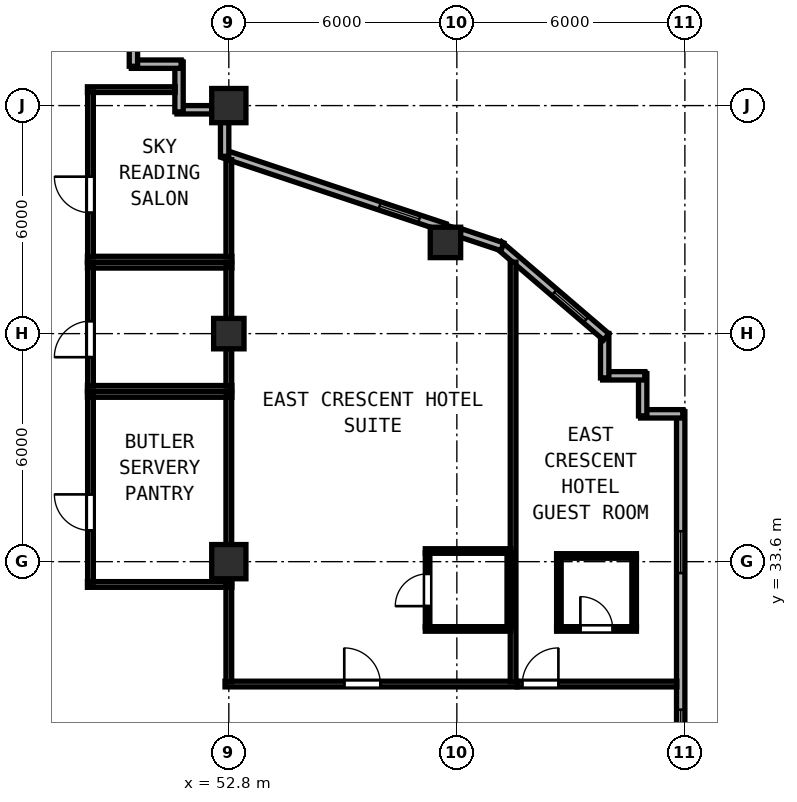
"""IFC4 building model, lengths in metres.
Left out: names, types, materials, properties, quantities, classifications, styles, units other than length and angle.
Written with IfcOpenShell. Run it as: python <this file> out.ifc"""

import sys

from ifc_helpers import new_model, si_unit, direction, frame, frame_2d, origin, origin_2d, place, context, subcontext, project, spatial, rectangle, hollow_rectangle, extrude, element, fill, save


model = new_model("IFC4")
c1 = context("Model", 3, precision=1e-05, world=origin(), true_north=direction((0.0, 1.0)))
c2 = subcontext(c1, "Body", "Model", "MODEL_VIEW")
j1 = project(units=[si_unit("LENGTHUNIT", "METRE"), si_unit("PLANEANGLEUNIT", "RADIAN")], contexts=[c1])
p1 = place(None, origin())
s1 = spatial("IfcSite", under=j1, at=p1, CompositionType="ELEMENT")
p2 = place(p1, origin())
s2 = spatial("IfcBuilding", under=s1, at=p2, CompositionType="ELEMENT")
p3 = place(p2, frame((0.0, 0.0, 184.2)))
s3 = spatial("IfcBuildingStorey", under=s2, at=p3, CompositionType="ELEMENT", Elevation=184.2)
for number, where, z_axis, x_axis in (
    (1, (52.8, 33.6, 0.0), (0.0, 0.0, 1.0), (1.0, 0.0, 0.0)),
    (2, (52.8, 45.6, 0.0), (0.0, 0.0, 1.0), (1.0, 0.0, 0.0)),
):
    element("IfcColumn", number, at=place(p3, frame(where, z_axis=z_axis, x_axis=x_axis)), inside=s3, PredefinedType="COLUMN", context=c2, shape_type="SweptSolid", body=[
        extrude(hollow_rectangle(XDim=0.9, YDim=0.9, WallThickness=0.034, at=origin_2d()), origin(), (0.0, 0.0, 1.0), 3.8),
    ])
for number, where, z_axis, x_axis in (
    (3, (52.8, 39.6, 0.0), (0.0, 0.0, 1.0), (1.0, 0.0, 0.0)),
    (4, (58.5, 42.0, 0.0), (0.0, 0.0, 1.0), (1.0, 0.0, 0.0)),
):
    element("IfcColumn", number, at=place(p3, frame(where, z_axis=z_axis, x_axis=x_axis)), inside=s3, PredefinedType="COLUMN", context=c2, shape_type="SweptSolid", body=[
        extrude(hollow_rectangle(XDim=0.8, YDim=0.8, WallThickness=0.03, at=origin_2d()), origin(), (0.0, 0.0, 1.0), 3.8),
    ])
p4 = place(p3, frame((64.69, 16.4, 0.0), z_axis=(0.0, 0.0, 1.0), x_axis=(0.0, 1.0, 0.0)))
e5 = element("IfcWall", 5, at=p4, inside=s3, PredefinedType="SOLIDWALL", context=c2, shape_type="SweptSolid", body=[
    extrude(rectangle(XDim=21.145, YDim=0.22, at=frame_2d((10.573, 0.0))), origin(), (0.0, 0.0, 1.0), 3.62),
])
p5 = place(p4, frame((1.05, 0.0, 0.85)))
e6 = element("IfcOpeningElement", 6, at=p5, cuts=e5, PredefinedType="OPENING", context=c2, shape_type="SweptSolid", body=[
    extrude(rectangle(XDim=1.1, YDim=1.75, at=frame_2d((0.55, 0.875))), frame((0.0, 0.12, 0.0), z_axis=(0.0, -1.0, 0.0), x_axis=(1.0, 0.0, 0.0)), (0.0, 0.0, 1.0), 0.24),
])
p6 = place(p4, frame((6.1, 0.0, 0.85)))
e7 = element("IfcOpeningElement", 7, at=p6, cuts=e5, PredefinedType="OPENING", context=c2, shape_type="SweptSolid", body=[
    extrude(rectangle(XDim=1.1, YDim=1.75, at=frame_2d((0.55, 0.875))), frame((0.0, 0.12, 0.0), z_axis=(0.0, -1.0, 0.0), x_axis=(1.0, 0.0, 0.0)), (0.0, 0.0, 1.0), 0.24),
])
p7 = place(p4, frame((12.205, 0.0, 0.85)))
e8 = element("IfcOpeningElement", 8, at=p7, cuts=e5, PredefinedType="OPENING", context=c2, shape_type="SweptSolid", body=[
    extrude(rectangle(XDim=1.1, YDim=1.75, at=frame_2d((0.55, 0.875))), frame((0.0, 0.12, 0.0), z_axis=(0.0, -1.0, 0.0), x_axis=(1.0, 0.0, 0.0)), (0.0, 0.0, 1.0), 0.24),
])
p8 = place(p4, frame((16.9, 0.0, 0.85)))
e9 = element("IfcOpeningElement", 9, at=p8, cuts=e5, PredefinedType="OPENING", context=c2, shape_type="SweptSolid", body=[
    extrude(rectangle(XDim=1.1, YDim=1.75, at=frame_2d((0.55, 0.875))), frame((0.0, 0.12, 0.0), z_axis=(0.0, -1.0, 0.0), x_axis=(1.0, 0.0, 0.0)), (0.0, 0.0, 1.0), 0.24),
])
p9 = place(p3, frame((64.745, 37.49, 0.0), z_axis=(0.0, 0.0, 1.0), x_axis=(-1.0, 0.0, 0.0)))
e10 = element("IfcWall", 10, at=p9, inside=s3, PredefinedType="SOLIDWALL", context=c2, shape_type="SweptSolid", body=[
    extrude(rectangle(XDim=1.11, YDim=0.22, at=frame_2d((0.555, 0.0))), origin(), (0.0, 0.0, 1.0), 3.62),
])
p10 = place(p3, frame((63.69, 37.435, 0.0), z_axis=(0.0, 0.0, 1.0), x_axis=(0.0, 1.0, 0.0)))
e11 = element("IfcWall", 11, at=p10, inside=s3, PredefinedType="SOLIDWALL", context=c2, shape_type="SweptSolid", body=[
    extrude(rectangle(XDim=1.11, YDim=0.22, at=frame_2d((0.555, 0.0))), origin(), (0.0, 0.0, 1.0), 3.62),
])
p11 = place(p3, frame((63.745, 38.49, 0.0), z_axis=(0.0, 0.0, 1.0), x_axis=(-1.0, 0.0, 0.0)))
e12 = element("IfcWall", 12, at=p11, inside=s3, PredefinedType="SOLIDWALL", context=c2, shape_type="SweptSolid", body=[
    extrude(rectangle(XDim=1.11, YDim=0.22, at=frame_2d((0.555, 0.0))), origin(), (0.0, 0.0, 1.0), 3.62),
])
p12 = place(p3, frame((62.69, 38.435, 0.0), z_axis=(0.0, 0.0, 1.0), x_axis=(0.0, 1.0, 0.0)))
e13 = element("IfcWall", 13, at=p12, inside=s3, PredefinedType="SOLIDWALL", context=c2, shape_type="SweptSolid", body=[
    extrude(rectangle(XDim=1.169, YDim=0.22, at=frame_2d((0.585, 0.0))), origin(), (0.0, 0.0, 1.0), 3.62),
])
p13 = place(p3, frame((62.732, 39.514, 0.0), z_axis=(0.0, 0.0, 1.0), x_axis=(-0.759251976569, 0.65079677018, 0.0)))
e14 = element("IfcWall", 14, at=p13, inside=s3, PredefinedType="SOLIDWALL", context=c2, shape_type="SweptSolid", body=[
    extrude(rectangle(XDim=3.726, YDim=0.22, at=frame_2d((1.863, 0.0))), origin(), (0.0, 0.0, 1.0), 3.62),
])
p14 = place(p13, frame((0.7, 0.0, 0.85)))
e15 = element("IfcOpeningElement", 15, at=p14, cuts=e14, PredefinedType="OPENING", context=c2, shape_type="SweptSolid", body=[
    extrude(rectangle(XDim=1.1, YDim=1.75, at=frame_2d((0.55, 0.875))), frame((0.0, 0.12, 0.0), z_axis=(0.0, -1.0, 0.0), x_axis=(1.0, 0.0, 0.0)), (0.0, 0.0, 1.0), 0.24),
])
p15 = place(p3, frame((59.997, 41.885, 0.0), z_axis=(0.0, 0.0, 1.0), x_axis=(-0.948662335685, 0.316290646166, 0.0)))
e16 = element("IfcWall", 16, at=p15, inside=s3, PredefinedType="SOLIDWALL", context=c2, shape_type="SweptSolid", body=[
    extrude(rectangle(XDim=1.165, YDim=0.22, at=frame_2d((0.583, 0.0))), origin(), (0.0, 0.0, 1.0), 3.62),
])
p16 = place(p3, frame((58.476, 42.392, 0.0), z_axis=(0.0, 0.0, 1.0), x_axis=(-0.948691231611, 0.316203964339, 0.0)))
e17 = element("IfcWall", 17, at=p16, inside=s3, PredefinedType="SOLIDWALL", context=c2, shape_type="SweptSolid", body=[
    extrude(rectangle(XDim=6.154, YDim=0.22, at=frame_2d((3.077, 0.0))), origin(), (0.0, 0.0, 1.0), 3.215),
])
p17 = place(p16, frame((0.7, 0.0, 0.85)))
e18 = element("IfcOpeningElement", 18, at=p17, cuts=e17, PredefinedType="OPENING", context=c2, shape_type="SweptSolid", body=[
    extrude(rectangle(XDim=1.1, YDim=1.75, at=frame_2d((0.55, 0.875))), frame((0.0, 0.12, 0.0), z_axis=(0.0, -1.0, 0.0), x_axis=(1.0, 0.0, 0.0)), (0.0, 0.0, 1.0), 0.24),
])
p18 = place(p3, frame((52.69, 44.266, 0.0), z_axis=(0.0, 0.0, 1.0), x_axis=(0.0, 1.0, 0.0)))
e19 = element("IfcWall", 19, at=p18, inside=s3, PredefinedType="SOLIDWALL", context=c2, shape_type="SweptSolid", body=[
    extrude(rectangle(XDim=0.892, YDim=0.22, at=frame_2d((0.446, 0.0))), origin(), (0.0, 0.0, 1.0), 3.215),
])
p19 = place(p3, frame((52.358, 45.49, 0.0), z_axis=(0.0, 0.0, 1.0), x_axis=(-1.0, 0.0, 0.0)))
e20 = element("IfcWall", 20, at=p19, inside=s3, PredefinedType="SOLIDWALL", context=c2, shape_type="SweptSolid", body=[
    extrude(rectangle(XDim=0.923, YDim=0.22, at=frame_2d((0.461, 0.0))), origin(), (0.0, 0.0, 1.0), 3.62),
])
p20 = place(p3, frame((51.49, 45.435, 0.0), z_axis=(0.0, 0.0, 1.0), x_axis=(0.0, 1.0, 0.0)))
e21 = element("IfcWall", 21, at=p20, inside=s3, PredefinedType="SOLIDWALL", context=c2, shape_type="SweptSolid", body=[
    extrude(rectangle(XDim=1.31, YDim=0.22, at=frame_2d((0.655, 0.0))), origin(), (0.0, 0.0, 1.0), 3.62),
])
p21 = place(p3, frame((51.545, 46.69, 0.0), z_axis=(0.0, 0.0, 1.0), x_axis=(-1.0, 0.0, 0.0)))
e22 = element("IfcWall", 22, at=p21, inside=s3, PredefinedType="SOLIDWALL", context=c2, shape_type="SweptSolid", body=[
    extrude(rectangle(XDim=1.31, YDim=0.22, at=frame_2d((0.655, 0.0))), origin(), (0.0, 0.0, 1.0), 3.62),
])
p22 = place(p3, frame((50.29, 46.635, 0.0), z_axis=(0.0, 0.0, 1.0), x_axis=(0.0, 1.0, 0.0)))
e23 = element("IfcWall", 23, at=p22, inside=s3, PredefinedType="SOLIDWALL", context=c2, shape_type="SweptSolid", body=[
    extrude(rectangle(XDim=1.535, YDim=0.22, at=frame_2d((0.768, 0.0))), origin(), (0.0, 0.0, 1.0), 3.62),
])
for number, where, z_axis, x_axis in (
    (24, (49.08, 38.0, 0.0), (0.0, 0.0, 1.0), (1.0, 0.0, 0.0)),
    (25, (49.08, 33.0, 0.0), (0.0, 0.0, 1.0), (1.0, 0.0, 0.0)),
):
    element("IfcWall", number, at=place(p3, frame(where, z_axis=z_axis, x_axis=x_axis)), inside=s3, PredefinedType="PARTITIONING", context=c2, shape_type="SweptSolid", body=[
        extrude(rectangle(XDim=3.8, YDim=0.15, at=frame_2d((1.9, 0.0))), origin(), (0.0, 0.0, 1.0), 3.62),
    ])
p23 = place(p3, frame((49.16, 33.06, 0.0), z_axis=(0.0, 0.0, 1.0), x_axis=(0.0, 1.0, 0.0)))
e26 = element("IfcWall", 26, at=p23, inside=s3, PredefinedType="PARTITIONING", context=c2, shape_type="SweptSolid", body=[
    extrude(rectangle(XDim=4.88, YDim=0.15, at=frame_2d((2.44, 0.0))), origin(), (0.0, 0.0, 1.0), 3.62),
])
p24 = place(p23, frame((1.36, 0.0, 0.0)))
e27 = element("IfcOpeningElement", 27, at=p24, cuts=e26, PredefinedType="OPENING", context=c2, shape_type="SweptSolid", body=[
    extrude(rectangle(XDim=0.95, YDim=2.12, at=frame_2d((0.475, 1.06))), frame((0.0, 0.085, 0.0), z_axis=(0.0, -1.0, 0.0), x_axis=(1.0, 0.0, 0.0)), (0.0, 0.0, 1.0), 0.17),
])
p25 = place(p3, frame((52.8, 33.06, 0.0), z_axis=(0.0, 0.0, 1.0), x_axis=(0.0, 1.0, 0.0)))
e28 = element("IfcWall", 28, at=p25, inside=s3, PredefinedType="PARTITIONING", context=c2, shape_type="SweptSolid", body=[
    extrude(rectangle(XDim=4.88, YDim=0.15, at=frame_2d((2.44, 0.0))), origin(), (0.0, 0.0, 1.0), 3.215),
])
for number, where, z_axis, x_axis in (
    (29, (49.08, 41.4, 0.0), (0.0, 0.0, 1.0), (1.0, 0.0, 0.0)),
    (30, (49.08, 38.16, 0.0), (0.0, 0.0, 1.0), (1.0, 0.0, 0.0)),
):
    element("IfcWall", number, at=place(p3, frame(where, z_axis=z_axis, x_axis=x_axis)), inside=s3, PredefinedType="PARTITIONING", context=c2, shape_type="SweptSolid", body=[
        extrude(rectangle(XDim=3.8, YDim=0.15, at=frame_2d((1.9, 0.0))), origin(), (0.0, 0.0, 1.0), 3.62),
    ])
p26 = place(p3, frame((49.16, 38.22, 0.0), z_axis=(0.0, 0.0, 1.0), x_axis=(0.0, 1.0, 0.0)))
e31 = element("IfcWall", 31, at=p26, inside=s3, PredefinedType="PARTITIONING", context=c2, shape_type="SweptSolid", body=[
    extrude(rectangle(XDim=3.12, YDim=0.15, at=frame_2d((1.56, 0.0))), origin(), (0.0, 0.0, 1.0), 3.62),
])
p27 = place(p26, frame((0.76, 0.0, 0.0)))
e32 = element("IfcOpeningElement", 32, at=p27, cuts=e31, PredefinedType="OPENING", context=c2, shape_type="SweptSolid", body=[
    extrude(rectangle(XDim=0.95, YDim=2.12, at=frame_2d((0.475, 1.06))), frame((0.0, 0.085, 0.0), z_axis=(0.0, -1.0, 0.0), x_axis=(1.0, 0.0, 0.0)), (0.0, 0.0, 1.0), 0.17),
])
p28 = place(p3, frame((52.8, 38.22, 0.0), z_axis=(0.0, 0.0, 1.0), x_axis=(0.0, 1.0, 0.0)))
e33 = element("IfcWall", 33, at=p28, inside=s3, PredefinedType="PARTITIONING", context=c2, shape_type="SweptSolid", body=[
    extrude(rectangle(XDim=3.12, YDim=0.15, at=frame_2d((1.56, 0.0))), origin(), (0.0, 0.0, 1.0), 3.215),
])
p29 = place(p3, frame((49.08, 46.02, 0.0), z_axis=(0.0, 0.0, 1.0), x_axis=(1.0, 0.0, 0.0)))
e34 = element("IfcWall", 34, at=p29, inside=s3, PredefinedType="PARTITIONING", context=c2, shape_type="SweptSolid", body=[
    extrude(rectangle(XDim=2.308, YDim=0.15, at=frame_2d((1.154, 0.0))), origin(), (0.0, 0.0, 1.0), 3.62),
])
p30 = place(p3, frame((49.08, 41.56, 0.0), z_axis=(0.0, 0.0, 1.0), x_axis=(1.0, 0.0, 0.0)))
e35 = element("IfcWall", 35, at=p30, inside=s3, PredefinedType="PARTITIONING", context=c2, shape_type="SweptSolid", body=[
    extrude(rectangle(XDim=3.8, YDim=0.15, at=frame_2d((1.9, 0.0))), origin(), (0.0, 0.0, 1.0), 3.62),
])
p31 = place(p3, frame((49.16, 41.62, 0.0), z_axis=(0.0, 0.0, 1.0), x_axis=(0.0, 1.0, 0.0)))
e36 = element("IfcWall", 36, at=p31, inside=s3, PredefinedType="PARTITIONING", context=c2, shape_type="SweptSolid", body=[
    extrude(rectangle(XDim=4.34, YDim=0.15, at=frame_2d((2.17, 0.0))), origin(), (0.0, 0.0, 1.0), 3.62),
])
p32 = place(p31, frame((1.16, 0.0, 0.0)))
e37 = element("IfcOpeningElement", 37, at=p32, cuts=e36, PredefinedType="OPENING", context=c2, shape_type="SweptSolid", body=[
    extrude(rectangle(XDim=0.95, YDim=2.12, at=frame_2d((0.475, 1.06))), frame((0.0, 0.085, 0.0), z_axis=(0.0, -1.0, 0.0), x_axis=(1.0, 0.0, 0.0)), (0.0, 0.0, 1.0), 0.17),
])
p33 = place(p3, frame((52.8, 41.62, 0.0), z_axis=(0.0, 0.0, 1.0), x_axis=(0.0, 1.0, 0.0)))
e38 = element("IfcWall", 38, at=p33, inside=s3, PredefinedType="PARTITIONING", context=c2, shape_type="SweptSolid", body=[
    extrude(rectangle(XDim=2.556, YDim=0.15, at=frame_2d((1.278, 0.0))), origin(), (0.0, 0.0, 1.0), 3.215),
])
p34 = place(p3, frame((52.7, 30.38, 0.0), z_axis=(0.0, 0.0, 1.0), x_axis=(1.0, 0.0, 0.0)))
e39 = element("IfcWall", 39, at=p34, inside=s3, PredefinedType="PARTITIONING", context=c2, shape_type="SweptSolid", body=[
    extrude(rectangle(XDim=7.68, YDim=0.15, at=frame_2d((3.84, 0.0))), origin(), (0.0, 0.0, 1.0), 3.62),
])
p35 = place(p34, frame((3.137, 0.0, 0.0)))
e40 = element("IfcOpeningElement", 40, at=p35, cuts=e39, PredefinedType="OPENING", context=c2, shape_type="SweptSolid", body=[
    extrude(rectangle(XDim=0.95, YDim=2.18, at=frame_2d((0.475, 1.09))), frame((0.0, 0.085, 0.0), z_axis=(0.0, -1.0, 0.0), x_axis=(1.0, 0.0, 0.0)), (0.0, 0.0, 1.0), 0.17),
])
p36 = place(p3, frame((52.8, 30.44, 0.0), z_axis=(0.0, 0.0, 1.0), x_axis=(0.0, 1.0, 0.0)))
e41 = element("IfcWall", 41, at=p36, inside=s3, PredefinedType="PARTITIONING", context=c2, shape_type="SweptSolid", body=[
    extrude(rectangle(XDim=2.5, YDim=0.15, at=frame_2d((1.25, 0.0))), origin(), (0.0, 0.0, 1.0), 3.215),
])
p37 = place(p3, frame((60.28, 30.44, 0.0), z_axis=(0.0, 0.0, 1.0), x_axis=(0.0, 1.0, 0.0)))
e42 = element("IfcWall", 42, at=p37, inside=s3, PredefinedType="PARTITIONING", context=c2, shape_type="SweptSolid", body=[
    extrude(rectangle(XDim=11.041, YDim=0.15, at=frame_2d((5.521, 0.0))), origin(), (0.0, 0.0, 1.0), 3.62),
])
for number, where, z_axis, x_axis in (
    (43, (57.97, 33.88, 0.0), (0.0, 0.0, 1.0), (1.0, 0.0, 0.0)),
    (44, (57.97, 31.83, 0.0), (0.0, 0.0, 1.0), (1.0, 0.0, 0.0)),
):
    element("IfcWall", number, at=place(p3, frame(where, z_axis=z_axis, x_axis=x_axis)), inside=s3, PredefinedType="PARTITIONING", context=c2, shape_type="SweptSolid", body=[
        extrude(rectangle(XDim=2.25, YDim=0.12, at=frame_2d((1.125, 0.0))), origin(), (0.0, 0.0, 1.0), 3.62),
    ])
p38 = place(p3, frame((58.03, 31.875, 0.0), z_axis=(0.0, 0.0, 1.0), x_axis=(0.0, 1.0, 0.0)))
e45 = element("IfcWall", 45, at=p38, inside=s3, PredefinedType="PARTITIONING", context=c2, shape_type="SweptSolid", body=[
    extrude(rectangle(XDim=1.96, YDim=0.12, at=frame_2d((0.98, 0.0))), origin(), (0.0, 0.0, 1.0), 3.62),
])
p39 = place(p38, frame((1.405, 0.0, 0.0), z_axis=(0.0, 0.0, 1.0), x_axis=(-1.0, 0.0, 0.0)))
e46 = element("IfcOpeningElement", 46, at=p39, cuts=e45, PredefinedType="OPENING", context=c2, shape_type="SweptSolid", body=[
    extrude(rectangle(XDim=0.85, YDim=2.1, at=frame_2d((0.425, 1.05))), frame((0.0, 0.07, 0.0), z_axis=(0.0, -1.0, 0.0), x_axis=(1.0, 0.0, 0.0)), (0.0, 0.0, 1.0), 0.14),
])
p40 = place(p3, frame((60.18, 31.875, 0.0), z_axis=(0.0, 0.0, 1.0), x_axis=(0.0, 1.0, 0.0)))
e47 = element("IfcWall", 47, at=p40, inside=s3, PredefinedType="PARTITIONING", context=c2, shape_type="SweptSolid", body=[
    extrude(rectangle(XDim=1.96, YDim=0.12, at=frame_2d((0.98, 0.0))), origin(), (0.0, 0.0, 1.0), 3.62),
])
p41 = place(p3, frame((60.382, 30.38, 0.0), z_axis=(0.0, 0.0, 1.0), x_axis=(1.0, 0.0, 0.0)))
e48 = element("IfcWall", 48, at=p41, inside=s3, PredefinedType="PARTITIONING", context=c2, shape_type="SweptSolid", body=[
    extrude(rectangle(XDim=4.206, YDim=0.15, at=frame_2d((2.103, 0.0))), origin(), (0.0, 0.0, 1.0), 3.62),
])
p42 = place(p41, frame((0.14, 0.0, 0.0)))
e49 = element("IfcOpeningElement", 49, at=p42, cuts=e48, PredefinedType="OPENING", context=c2, shape_type="SweptSolid", body=[
    extrude(rectangle(XDim=0.95, YDim=2.15, at=frame_2d((0.475, 1.075))), frame((0.0, 0.085, 0.0), z_axis=(0.0, -1.0, 0.0), x_axis=(1.0, 0.0, 0.0)), (0.0, 0.0, 1.0), 0.17),
])
p43 = place(p3, frame((61.425, 33.75, 0.0), z_axis=(0.0, 0.0, 1.0), x_axis=(1.0, 0.0, 0.0)))
e50 = element("IfcWall", 50, at=p43, inside=s3, PredefinedType="PARTITIONING", context=c2, shape_type="SweptSolid", body=[
    extrude(rectangle(XDim=2.1, YDim=0.12, at=frame_2d((1.05, 0.0))), origin(), (0.0, 0.0, 1.0), 3.62),
])
p44 = place(p3, frame((61.425, 31.83, 0.0), z_axis=(0.0, 0.0, 1.0), x_axis=(1.0, 0.0, 0.0)))
e51 = element("IfcWall", 51, at=p44, inside=s3, PredefinedType="PARTITIONING", context=c2, shape_type="SweptSolid", body=[
    extrude(rectangle(XDim=2.1, YDim=0.12, at=frame_2d((1.05, 0.0))), origin(), (0.0, 0.0, 1.0), 3.62),
])
p45 = place(p44, frame((0.625, 0.0, 0.0)))
e52 = element("IfcOpeningElement", 52, at=p45, cuts=e51, PredefinedType="OPENING", context=c2, shape_type="SweptSolid", body=[
    extrude(rectangle(XDim=0.85, YDim=2.1, at=frame_2d((0.425, 1.05))), frame((0.0, 0.07, 0.0), z_axis=(0.0, -1.0, 0.0), x_axis=(1.0, 0.0, 0.0)), (0.0, 0.0, 1.0), 0.14),
])
for number, where, z_axis, x_axis in (
    (53, (61.485, 31.875, 0.0), (0.0, 0.0, 1.0), (0.0, 1.0, 0.0)),
    (54, (63.465, 31.875, 0.0), (0.0, 0.0, 1.0), (0.0, 1.0, 0.0)),
):
    element("IfcWall", number, at=place(p3, frame(where, z_axis=z_axis, x_axis=x_axis)), inside=s3, PredefinedType="PARTITIONING", context=c2, shape_type="SweptSolid", body=[
        extrude(rectangle(XDim=1.83, YDim=0.12, at=frame_2d((0.915, 0.0))), origin(), (0.0, 0.0, 1.0), 3.62),
    ])
p46 = place(p7, origin())
e55 = element("IfcWindow", 55, at=p46, inside=s3, PartitioningType="SINGLE_PANEL", PredefinedType="WINDOW", context=c2, shape_type="SweptSolid", body=[
    extrude(rectangle(XDim=1.1, YDim=1.75, at=frame_2d((0.55, 0.875))), frame((0.0, 0.03, 0.0), z_axis=(0.0, -1.0, 0.0), x_axis=(1.0, 0.0, 0.0)), (0.0, 0.0, 1.0), 0.06),
])
fill(e8, e55)
p47 = place(p8, origin())
e56 = element("IfcWindow", 56, at=p47, inside=s3, PartitioningType="SINGLE_PANEL", PredefinedType="WINDOW", context=c2, shape_type="SweptSolid", body=[
    extrude(rectangle(XDim=1.1, YDim=1.75, at=frame_2d((0.55, 0.875))), frame((0.0, 0.03, 0.0), z_axis=(0.0, -1.0, 0.0), x_axis=(1.0, 0.0, 0.0)), (0.0, 0.0, 1.0), 0.06),
])
fill(e9, e56)
p48 = place(p14, origin())
e57 = element("IfcWindow", 57, at=p48, inside=s3, PartitioningType="SINGLE_PANEL", PredefinedType="WINDOW", context=c2, shape_type="SweptSolid", body=[
    extrude(rectangle(XDim=1.1, YDim=1.75, at=frame_2d((0.55, 0.875))), frame((0.0, 0.03, 0.0), z_axis=(0.0, -1.0, 0.0), x_axis=(1.0, 0.0, 0.0)), (0.0, 0.0, 1.0), 0.06),
])
fill(e15, e57)
p49 = place(p17, origin())
e58 = element("IfcWindow", 58, at=p49, inside=s3, PartitioningType="SINGLE_PANEL", PredefinedType="WINDOW", context=c2, shape_type="SweptSolid", body=[
    extrude(rectangle(XDim=1.1, YDim=1.75, at=frame_2d((0.55, 0.875))), frame((0.0, 0.03, 0.0), z_axis=(0.0, -1.0, 0.0), x_axis=(1.0, 0.0, 0.0)), (0.0, 0.0, 1.0), 0.06),
])
fill(e18, e58)
p50 = place(p24, origin())
e59 = element("IfcDoor", 59, at=p50, inside=s3, OperationType="SINGLE_SWING_RIGHT", PredefinedType="DOOR", context=c2, shape_type="SweptSolid", body=[
    extrude(rectangle(XDim=0.95, YDim=2.12, at=frame_2d((0.475, 1.06))), frame((0.0, 0.025, 0.0), z_axis=(0.0, -1.0, 0.0), x_axis=(1.0, 0.0, 0.0)), (0.0, 0.0, 1.0), 0.05),
])
fill(e27, e59)
p51 = place(p27, origin())
e60 = element("IfcDoor", 60, at=p51, inside=s3, OperationType="SINGLE_SWING_LEFT", PredefinedType="DOOR", context=c2, shape_type="SweptSolid", body=[
    extrude(rectangle(XDim=0.95, YDim=2.12, at=frame_2d((0.475, 1.06))), frame((0.0, 0.025, 0.0), z_axis=(0.0, -1.0, 0.0), x_axis=(1.0, 0.0, 0.0)), (0.0, 0.0, 1.0), 0.05),
])
fill(e32, e60)
p52 = place(p32, origin())
e61 = element("IfcDoor", 61, at=p52, inside=s3, OperationType="SINGLE_SWING_RIGHT", PredefinedType="DOOR", context=c2, shape_type="SweptSolid", body=[
    extrude(rectangle(XDim=0.95, YDim=2.12, at=frame_2d((0.475, 1.06))), frame((0.0, 0.025, 0.0), z_axis=(0.0, -1.0, 0.0), x_axis=(1.0, 0.0, 0.0)), (0.0, 0.0, 1.0), 0.05),
])
fill(e37, e61)
p53 = place(p35, origin())
e62 = element("IfcDoor", 62, at=p53, inside=s3, OperationType="SINGLE_SWING_LEFT", PredefinedType="DOOR", context=c2, shape_type="SweptSolid", body=[
    extrude(rectangle(XDim=0.95, YDim=2.18, at=frame_2d((0.475, 1.09))), frame((0.0, 0.025, 0.0), z_axis=(0.0, -1.0, 0.0), x_axis=(1.0, 0.0, 0.0)), (0.0, 0.0, 1.0), 0.05),
])
fill(e40, e62)
p54 = place(p39, origin())
e63 = element("IfcDoor", 63, at=p54, inside=s3, OperationType="SINGLE_SWING_RIGHT", PredefinedType="DOOR", context=c2, shape_type="SweptSolid", body=[
    extrude(rectangle(XDim=0.85, YDim=2.1, at=frame_2d((0.425, 1.05))), frame((0.0, 0.025, 0.0), z_axis=(0.0, -1.0, 0.0), x_axis=(1.0, 0.0, 0.0)), (0.0, 0.0, 1.0), 0.05),
])
fill(e46, e63)
p55 = place(p42, origin())
e64 = element("IfcDoor", 64, at=p55, inside=s3, OperationType="SINGLE_SWING_RIGHT", PredefinedType="DOOR", context=c2, shape_type="SweptSolid", body=[
    extrude(rectangle(XDim=0.95, YDim=2.15, at=frame_2d((0.475, 1.075))), frame((0.0, 0.025, 0.0), z_axis=(0.0, -1.0, 0.0), x_axis=(1.0, 0.0, 0.0)), (0.0, 0.0, 1.0), 0.05),
])
fill(e49, e64)
p56 = place(p45, origin())
e65 = element("IfcDoor", 65, at=p56, inside=s3, OperationType="SINGLE_SWING_LEFT", PredefinedType="DOOR", context=c2, shape_type="SweptSolid", body=[
    extrude(rectangle(XDim=0.85, YDim=2.1, at=frame_2d((0.425, 1.05))), frame((0.0, 0.025, 0.0), z_axis=(0.0, -1.0, 0.0), x_axis=(1.0, 0.0, 0.0)), (0.0, 0.0, 1.0), 0.05),
])
fill(e52, e65)
save(model, sys.argv[1])
